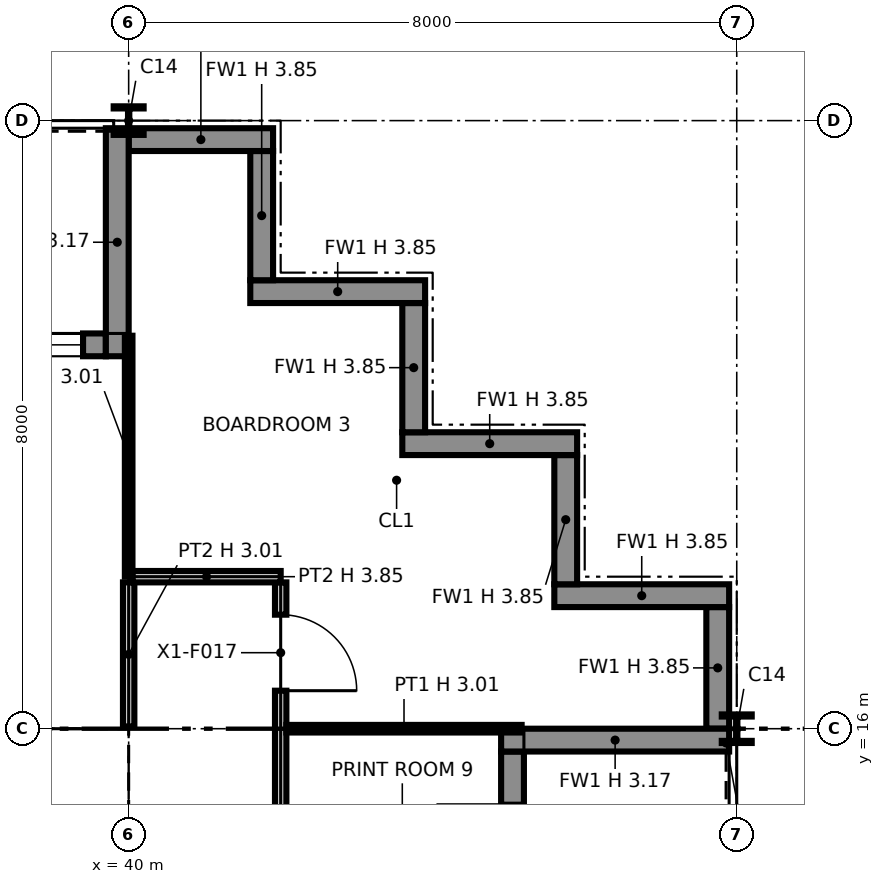
"""IFC4 building model, lengths in metres.
Left out: names, types, materials, properties, quantities, classifications, styles, units other than length and angle.
Written with IfcOpenShell. Run it as: python <this file> out.ifc"""

import sys

from ifc_helpers import new_model, si_unit, direction, frame, frame_2d, origin, origin_2d, place, context, subcontext, project, spatial, polyline, rectangle, i_section, outline, extrude, element, fill, save


model = new_model("IFC4")
c1 = context("Model", 3, precision=1e-05, world=origin(), true_north=direction((0.0, 1.0)))
c2 = subcontext(c1, "Body", "Model", "MODEL_VIEW")
j1 = project(units=[si_unit("LENGTHUNIT", "METRE"), si_unit("PLANEANGLEUNIT", "RADIAN")], contexts=[c1])
p1 = place(None, origin())
s1 = spatial("IfcSite", under=j1, at=p1, CompositionType="ELEMENT")
p2 = place(p1, origin())
s2 = spatial("IfcBuilding", under=s1, at=p2, CompositionType="ELEMENT")
p3 = place(p2, frame((0.0, 0.0, 247.0)))
s3 = spatial("IfcBuildingStorey", under=s2, at=p3, CompositionType="ELEMENT", Elevation=247.0)
p4 = place(p3, frame((40.0, 16.0, 0.0), z_axis=(0.0, 0.0, 1.0), x_axis=(1.0, 0.0, 0.0)))
e1 = element("IfcColumn", 1, at=p4, inside=s3, PredefinedType="COLUMN", context=c2, shape_type="SweptSolid", body=[
    extrude(i_section(OverallWidth=0.371, OverallDepth=0.361, WebThickness=0.012, FlangeThickness=0.02, at=origin_2d()), origin(), (0.0, 0.0, 1.0), 3.85),
])
for number, where, z_axis, x_axis in (
    (2, (40.0, 24.0, 0.0), (0.0, 0.0, 1.0), (1.0, 0.0, 0.0)),
    (3, (48.0, 16.0, 0.0), (0.0, 0.0, 1.0), (1.0, 0.0, 0.0)),
):
    element("IfcColumn", number, at=place(p3, frame(where, z_axis=z_axis, x_axis=x_axis)), inside=s3, PredefinedType="COLUMN", context=c2, shape_type="SweptSolid", body=[
        extrude(i_section(OverallWidth=0.394, OverallDepth=0.376, WebThickness=0.017, FlangeThickness=0.028, at=origin_2d()), origin(), (0.0, 0.0, 1.0), 3.85),
    ])
p5 = place(p3, frame((45.05, 8.3, 0.0), z_axis=(0.0, 0.0, 1.0), x_axis=(0.0, 1.0, 0.0)))
e4 = element("IfcWall", 4, at=p5, inside=s3, PredefinedType="SOLIDWALL", context=c2, shape_type="SweptSolid", body=[
    extrude(rectangle(XDim=7.4, YDim=0.3, at=frame_2d((3.7, 0.0))), origin(), (0.0, 0.0, 1.0), 3.85),
])
p6 = place(p5, frame((0.3, 0.0, 0.9)))
e5 = element("IfcOpeningElement", 5, at=p6, cuts=e4, PredefinedType="OPENING", context=c2, shape_type="SweptSolid", body=[
    extrude(rectangle(XDim=2.8, YDim=2.2, at=frame_2d((1.4, 1.1))), frame((0.0, 0.16, 0.0), z_axis=(0.0, -1.0, 0.0), x_axis=(1.0, 0.0, 0.0)), (0.0, 0.0, 1.0), 0.32),
])
p7 = place(p5, frame((4.7, 0.0, 0.0)))
e6 = element("IfcOpeningElement", 6, at=p7, cuts=e4, PredefinedType="OPENING", context=c2, shape_type="SweptSolid", body=[
    extrude(rectangle(XDim=2.0, YDim=2.4, at=frame_2d((1.0, 1.2))), frame((0.0, 0.16, 0.0), z_axis=(0.0, -1.0, 0.0), x_axis=(1.0, 0.0, 0.0)), (0.0, 0.0, 1.0), 0.32),
])
p8 = place(p3, frame((47.9, 15.85, 0.0), z_axis=(0.0, 0.0, 1.0), x_axis=(-1.0, 0.0, 0.0)))
e7 = element("IfcWall", 7, at=p8, inside=s3, PredefinedType="SOLIDWALL", context=c2, shape_type="SweptSolid", body=[
    extrude(rectangle(XDim=3.0, YDim=0.3, at=frame_2d((1.5, 0.0))), origin(), (0.0, 0.0, 1.0), 3.171),
])
p9 = place(p3, frame((47.75, 16.0, 0.0), z_axis=(0.0, 0.0, 1.0), x_axis=(0.0, 1.0, 0.0)))
e8 = element("IfcWall", 8, at=p9, inside=s3, PredefinedType="SOLIDWALL", context=c2, shape_type="SweptSolid", body=[
    extrude(rectangle(XDim=1.6, YDim=0.3, at=frame_2d((0.8, 0.0))), origin(), (0.0, 0.0, 1.0), 3.85),
])
p10 = place(p3, frame((47.9, 17.75, 0.0), z_axis=(0.0, 0.0, 1.0), x_axis=(-1.0, 0.0, 0.0)))
e9 = element("IfcWall", 9, at=p10, inside=s3, PredefinedType="SOLIDWALL", context=c2, shape_type="SweptSolid", body=[
    extrude(rectangle(XDim=2.3, YDim=0.3, at=frame_2d((1.15, 0.0))), origin(), (0.0, 0.0, 1.0), 3.85),
])
p11 = place(p3, frame((45.75, 17.9, 0.0), z_axis=(0.0, 0.0, 1.0), x_axis=(0.0, 1.0, 0.0)))
e10 = element("IfcWall", 10, at=p11, inside=s3, PredefinedType="SOLIDWALL", context=c2, shape_type="SweptSolid", body=[
    extrude(rectangle(XDim=1.7, YDim=0.3, at=frame_2d((0.85, 0.0))), origin(), (0.0, 0.0, 1.0), 3.85),
])
p12 = place(p3, frame((45.9, 19.75, 0.0), z_axis=(0.0, 0.0, 1.0), x_axis=(-1.0, 0.0, 0.0)))
e11 = element("IfcWall", 11, at=p12, inside=s3, PredefinedType="SOLIDWALL", context=c2, shape_type="SweptSolid", body=[
    extrude(rectangle(XDim=2.3, YDim=0.3, at=frame_2d((1.15, 0.0))), origin(), (0.0, 0.0, 1.0), 3.85),
])
p13 = place(p3, frame((43.75, 19.9, 0.0), z_axis=(0.0, 0.0, 1.0), x_axis=(0.0, 1.0, 0.0)))
e12 = element("IfcWall", 12, at=p13, inside=s3, PredefinedType="SOLIDWALL", context=c2, shape_type="SweptSolid", body=[
    extrude(rectangle(XDim=1.7, YDim=0.3, at=frame_2d((0.85, 0.0))), origin(), (0.0, 0.0, 1.0), 3.85),
])
p14 = place(p3, frame((43.9, 21.75, 0.0), z_axis=(0.0, 0.0, 1.0), x_axis=(-1.0, 0.0, 0.0)))
e13 = element("IfcWall", 13, at=p14, inside=s3, PredefinedType="SOLIDWALL", context=c2, shape_type="SweptSolid", body=[
    extrude(rectangle(XDim=2.3, YDim=0.3, at=frame_2d((1.15, 0.0))), origin(), (0.0, 0.0, 1.0), 3.85),
])
p15 = place(p3, frame((41.75, 21.9, 0.0), z_axis=(0.0, 0.0, 1.0), x_axis=(0.0, 1.0, 0.0)))
e14 = element("IfcWall", 14, at=p15, inside=s3, PredefinedType="SOLIDWALL", context=c2, shape_type="SweptSolid", body=[
    extrude(rectangle(XDim=1.7, YDim=0.3, at=frame_2d((0.85, 0.0))), origin(), (0.0, 0.0, 1.0), 3.85),
])
p16 = place(p3, frame((41.9, 23.75, 0.0), z_axis=(0.0, 0.0, 1.0), x_axis=(-1.0, 0.0, 0.0)))
e15 = element("IfcWall", 15, at=p16, inside=s3, PredefinedType="SOLIDWALL", context=c2, shape_type="SweptSolid", body=[
    extrude(rectangle(XDim=1.9, YDim=0.3, at=frame_2d((0.95, 0.0))), origin(), (0.0, 0.0, 1.0), 3.85),
])
p17 = place(p3, frame((39.7, 21.05, 0.0), z_axis=(0.0, 0.0, 1.0), x_axis=(-1.0, 0.0, 0.0)))
e16 = element("IfcWall", 16, at=p17, inside=s3, PredefinedType="SOLIDWALL", context=c2, shape_type="SweptSolid", body=[
    extrude(rectangle(XDim=7.4, YDim=0.3, at=frame_2d((3.7, 0.0))), origin(), (0.0, 0.0, 1.0), 3.85),
])
p18 = place(p17, frame((0.3, 0.0, 0.9)))
e17 = element("IfcOpeningElement", 17, at=p18, cuts=e16, PredefinedType="OPENING", context=c2, shape_type="SweptSolid", body=[
    extrude(rectangle(XDim=2.8, YDim=2.2, at=frame_2d((1.4, 1.1))), frame((0.0, 0.16, 0.0), z_axis=(0.0, -1.0, 0.0), x_axis=(1.0, 0.0, 0.0)), (0.0, 0.0, 1.0), 0.32),
])
p19 = place(p17, frame((4.7, 0.0, 0.0)))
e18 = element("IfcOpeningElement", 18, at=p19, cuts=e16, PredefinedType="OPENING", context=c2, shape_type="SweptSolid", body=[
    extrude(rectangle(XDim=2.0, YDim=2.4, at=frame_2d((1.0, 1.2))), frame((0.0, 0.16, 0.0), z_axis=(0.0, -1.0, 0.0), x_axis=(1.0, 0.0, 0.0)), (0.0, 0.0, 1.0), 0.32),
])
p20 = place(p3, frame((39.85, 23.9, 0.0), z_axis=(0.0, 0.0, 1.0), x_axis=(0.0, -1.0, 0.0)))
e19 = element("IfcWall", 19, at=p20, inside=s3, PredefinedType="SOLIDWALL", context=c2, shape_type="SweptSolid", body=[
    extrude(rectangle(XDim=3.0, YDim=0.3, at=frame_2d((1.5, 0.0))), origin(), (0.0, 0.0, 1.0), 3.171),
])
p21 = place(p3, frame((24.65, 15.25, 0.0), z_axis=(0.0, 0.0, 1.0), x_axis=(1.0, 0.0, 0.0)))
e20 = element("IfcWall", 20, at=p21, inside=s3, PredefinedType="PARTITIONING", context=c2, shape_type="SweptSolid", body=[
    extrude(outline(polyline([(0.0, 0.0), (14.7, 0.0), (14.7, 3.85), (7.438, 3.85), (7.438, 3.308), (7.262, 3.308), (7.261, 3.85), (0.0, 3.85), (0.0, 0.0)])), frame((0.0, 0.1, 0.0), z_axis=(0.0, -1.0, 0.0), x_axis=(1.0, 0.0, 0.0)), (0.0, 0.0, 1.0), 0.2),
])
p22 = place(p21, frame((2.85, 0.0, 0.0)))
e21 = element("IfcOpeningElement", 21, at=p22, cuts=e20, PredefinedType="OPENING", context=c2, shape_type="SweptSolid", body=[
    extrude(rectangle(XDim=1.8, YDim=2.1, at=frame_2d((0.9, 1.05))), frame((0.0, 0.11, 0.0), z_axis=(0.0, -1.0, 0.0), x_axis=(1.0, 0.0, 0.0)), (0.0, 0.0, 1.0), 0.22),
])
p23 = place(p21, frame((9.95, 0.0, 0.0), z_axis=(0.0, 0.0, 1.0), x_axis=(-1.0, 0.0, 0.0)))
e22 = element("IfcOpeningElement", 22, at=p23, cuts=e20, PredefinedType="OPENING", context=c2, shape_type="SweptSolid", body=[
    extrude(rectangle(XDim=1.4, YDim=2.1, at=frame_2d((0.7, 1.05))), frame((0.0, 0.11, 0.0), z_axis=(0.0, -1.0, 0.0), x_axis=(1.0, 0.0, 0.0)), (0.0, 0.0, 1.0), 0.22),
])
p24 = place(p21, frame((13.4, 0.0, 0.0), z_axis=(0.0, 0.0, 1.0), x_axis=(-1.0, 0.0, 0.0)))
e23 = element("IfcOpeningElement", 23, at=p24, cuts=e20, PredefinedType="OPENING", context=c2, shape_type="SweptSolid", body=[
    extrude(rectangle(XDim=1.4, YDim=2.1, at=frame_2d((0.7, 1.05))), frame((0.0, 0.11, 0.0), z_axis=(0.0, -1.0, 0.0), x_axis=(1.0, 0.0, 0.0)), (0.0, 0.0, 1.0), 0.22),
])
p25 = place(p3, frame((39.25, 8.85, 0.0), z_axis=(0.0, 0.0, 1.0), x_axis=(0.0, 1.0, 0.0)))
e24 = element("IfcWall", 24, at=p25, inside=s3, PredefinedType="PARTITIONING", context=c2, shape_type="SweptSolid", body=[
    extrude(rectangle(XDim=6.3, YDim=0.2, at=frame_2d((3.15, 0.0))), origin(), (0.0, 0.0, 1.0), 3.85),
])
p26 = place(p3, frame((42.0, 6.0, 0.0), z_axis=(0.0, 0.0, 1.0), x_axis=(0.0, 1.0, 0.0)))
e25 = element("IfcWall", 25, at=p26, inside=s3, PredefinedType="PARTITIONING", context=c2, shape_type="SweptSolid", body=[
    extrude(rectangle(XDim=11.925, YDim=0.15, at=frame_2d((5.962, 0.0))), origin(), (0.0, 0.0, 1.0), 3.014),
])
p27 = place(p26, frame((4.5, 0.0, 0.0), z_axis=(0.0, 0.0, 1.0), x_axis=(-1.0, 0.0, 0.0)))
e26 = element("IfcOpeningElement", 26, at=p27, cuts=e25, PredefinedType="OPENING", context=c2, shape_type="SweptSolid", body=[
    extrude(rectangle(XDim=1.0, YDim=2.1, at=frame_2d((0.5, 1.05))), frame((0.0, 0.085, 0.0), z_axis=(0.0, -1.0, 0.0), x_axis=(1.0, 0.0, 0.0)), (0.0, 0.0, 1.0), 0.17),
])
p28 = place(p26, frame((8.5, 0.0, 0.0), z_axis=(0.0, 0.0, 1.0), x_axis=(-1.0, 0.0, 0.0)))
e27 = element("IfcOpeningElement", 27, at=p28, cuts=e25, PredefinedType="OPENING", context=c2, shape_type="SweptSolid", body=[
    extrude(rectangle(XDim=1.0, YDim=2.1, at=frame_2d((0.5, 1.05))), frame((0.0, 0.085, 0.0), z_axis=(0.0, -1.0, 0.0), x_axis=(1.0, 0.0, 0.0)), (0.0, 0.0, 1.0), 0.17),
])
p29 = place(p26, frame((11.5, 0.0, 0.0), z_axis=(0.0, 0.0, 1.0), x_axis=(-1.0, 0.0, 0.0)))
e28 = element("IfcOpeningElement", 28, at=p29, cuts=e25, PredefinedType="OPENING", context=c2, shape_type="SweptSolid", body=[
    extrude(rectangle(XDim=1.0, YDim=2.1, at=frame_2d((0.5, 1.05))), frame((0.0, 0.085, 0.0), z_axis=(0.0, -1.0, 0.0), x_axis=(1.0, 0.0, 0.0)), (0.0, 0.0, 1.0), 0.17),
])
p30 = place(p3, frame((42.075, 16.0, 0.0), z_axis=(0.0, 0.0, 1.0), x_axis=(1.0, 0.0, 0.0)))
e29 = element("IfcWall", 29, at=p30, inside=s3, PredefinedType="PARTITIONING", context=c2, shape_type="SweptSolid", body=[
    extrude(rectangle(XDim=3.095, YDim=0.1, at=frame_2d((1.547, 0.0))), origin(), (0.0, 0.0, 1.0), 3.014),
])
p31 = place(p3, frame((40.0, 16.03, 0.0), z_axis=(0.0, 0.0, 1.0), x_axis=(0.0, 1.0, 0.0)))
e30 = element("IfcWall", 30, at=p31, inside=s3, PredefinedType="PARTITIONING", context=c2, shape_type="SweptSolid", body=[
    extrude(rectangle(XDim=1.895, YDim=0.15, at=frame_2d((0.948, 0.0))), origin(), (0.0, 0.0, 1.0), 3.014),
])
p32 = place(p3, frame((40.05, 18.0, 0.0), z_axis=(0.0, 0.0, 1.0), x_axis=(1.0, 0.0, 0.0)))
e31 = element("IfcWall", 31, at=p32, inside=s3, PredefinedType="PARTITIONING", context=c2, shape_type="SweptSolid", body=[
    extrude(rectangle(XDim=1.95, YDim=0.15, at=frame_2d((0.975, 0.0))), origin(), (0.0, 0.0, 1.0), 3.85),
])
p33 = place(p3, frame((40.0, 18.0, 0.0), z_axis=(0.0, 0.0, 1.0), x_axis=(0.0, 1.0, 0.0)))
e32 = element("IfcWall", 32, at=p33, inside=s3, PredefinedType="PARTITIONING", context=c2, shape_type="SweptSolid", body=[
    extrude(rectangle(XDim=3.17, YDim=0.1, at=frame_2d((1.585, 0.0))), origin(), (0.0, 0.0, 1.0), 3.014),
])
p34 = place(p18, origin())
e33 = element("IfcWindow", 33, at=p34, inside=s3, PartitioningType="SINGLE_PANEL", PredefinedType="WINDOW", context=c2, shape_type="SweptSolid", body=[
    extrude(rectangle(XDim=2.8, YDim=2.2, at=frame_2d((1.4, 1.1))), frame((0.0, 0.03, 0.0), z_axis=(0.0, -1.0, 0.0), x_axis=(1.0, 0.0, 0.0)), (0.0, 0.0, 1.0), 0.06),
])
fill(e17, e33)
p35 = place(p29, origin())
e34 = element("IfcDoor", 34, at=p35, inside=s3, OperationType="SINGLE_SWING_RIGHT", PredefinedType="DOOR", context=c2, shape_type="SweptSolid", body=[
    extrude(rectangle(XDim=1.0, YDim=2.1, at=frame_2d((0.5, 1.05))), frame((0.0, 0.025, 0.0), z_axis=(0.0, -1.0, 0.0), x_axis=(1.0, 0.0, 0.0)), (0.0, 0.0, 1.0), 0.05),
])
fill(e28, e34)
save(model, sys.argv[1])
